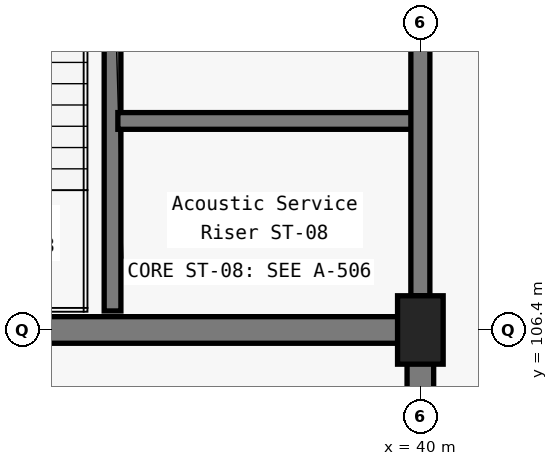
"""IFC4 building model, lengths in metres.
Left out: names, types, materials, properties, quantities, classifications, styles, units other than length and angle.
Written with IfcOpenShell. Run it as: python <this file> out.ifc"""

import sys

from ifc_helpers import new_model, si_unit, direction, frame, frame_2d, origin, origin_2d, place, context, subcontext, project, spatial, rectangle, extrude, element, save


model = new_model("IFC4")
c1 = context("Model", 3, precision=1e-05, world=origin(), true_north=direction((0.0, 1.0)))
c2 = subcontext(c1, "Body", "Model", "MODEL_VIEW")
j1 = project(units=[si_unit("LENGTHUNIT", "METRE"), si_unit("PLANEANGLEUNIT", "RADIAN")], contexts=[c1])
p1 = place(None, origin())
s1 = spatial("IfcSite", under=j1, at=p1, CompositionType="ELEMENT")
p2 = place(p1, origin())
s2 = spatial("IfcBuilding", under=s1, at=p2, CompositionType="ELEMENT")
p3 = place(p2, frame((0.0, 0.0, -5.4)))
s3 = spatial("IfcBuildingStorey", under=s2, at=p3, CompositionType="ELEMENT", Elevation=-5.4)
p4 = place(p3, frame((40.0, 106.4, 0.0), z_axis=(0.0, 0.0, 1.0), x_axis=(1.0, 0.0, 0.0)))
e1 = element("IfcColumn", 1, at=p4, inside=s3, PredefinedType="COLUMN", context=c2, shape_type="SweptSolid", body=[
    extrude(rectangle(XDim=0.6, YDim=0.9, at=origin_2d()), origin(), (0.0, 0.0, 1.0), 5.4),
])
p5 = place(p3, frame((32.0, 106.4, 0.0), z_axis=(0.0, 0.0, 1.0), x_axis=(1.0, 0.0, 0.0)))
e2 = element("IfcWall", 2, at=p5, inside=s3, PredefinedType="SHEAR", context=c2, shape_type="SweptSolid", body=[
    extrude(rectangle(XDim=8.0, YDim=0.35, at=frame_2d((4.0, 0.0))), origin(), (0.0, 0.0, 1.0), 5.08),
])
p6 = place(p3, frame((40.0, 98.8, 0.0), z_axis=(0.0, 0.0, 1.0), x_axis=(0.0, 1.0, 0.0)))
e3 = element("IfcWall", 3, at=p6, inside=s3, PredefinedType="SHEAR", context=c2, shape_type="SweptSolid", body=[
    extrude(rectangle(XDim=7.6, YDim=0.35, at=frame_2d((3.8, 0.0))), origin(), (0.0, 0.0, 1.0), 5.08),
])
p7 = place(p3, frame((35.95, 106.65, 0.0), z_axis=(0.0, 0.0, 1.0), x_axis=(0.0, 1.0, 0.0)))
e4 = element("IfcWall", 4, at=p7, inside=s3, PredefinedType="SOLIDWALL", context=c2, shape_type="SweptSolid", body=[
    extrude(rectangle(XDim=7.1, YDim=0.22, at=frame_2d((3.55, 0.0))), origin(), (0.0, 0.0, 1.0), 5.08),
])
p8 = place(p7, frame((5.55, 0.0, 0.0)))
e5 = element("IfcOpeningElement", 5, at=p8, cuts=e4, PredefinedType="OPENING", context=c2, shape_type="SweptSolid", body=[
    extrude(rectangle(XDim=1.2, YDim=2.15, at=frame_2d((0.6, 1.075))), frame((0.0, 0.12, 0.0), z_axis=(0.0, -1.0, 0.0), x_axis=(1.0, 0.0, 0.0)), (0.0, 0.0, 1.0), 0.24),
])
p9 = place(p3, frame((36.02, 109.15, 0.0), z_axis=(0.0, 0.0, 1.0), x_axis=(1.0, 0.0, 0.0)))
e6 = element("IfcWall", 6, at=p9, inside=s3, PredefinedType="SOLIDWALL", context=c2, shape_type="SweptSolid", body=[
    extrude(rectangle(XDim=3.93, YDim=0.22, at=frame_2d((1.965, 0.0))), origin(), (0.0, 0.0, 1.0), 4.435),
])
p10 = place(p3, frame((40.0, 106.85, 0.0), z_axis=(0.0, 0.0, 1.0), x_axis=(0.0, 1.0, 0.0)))
e7 = element("IfcWall", 7, at=p10, inside=s3, PredefinedType="SOLIDWALL", context=c2, shape_type="SweptSolid", body=[
    extrude(rectangle(XDim=6.775, YDim=0.25, at=frame_2d((3.387, 0.0))), origin(), (0.0, 0.0, 1.0), 4.305),
])
p11 = place(p10, frame((3.4, 0.0, 0.0)))
e8 = element("IfcOpeningElement", 8, at=p11, cuts=e7, PredefinedType="OPENING", context=c2, shape_type="SweptSolid", body=[
    extrude(rectangle(XDim=1.35, YDim=2.2, at=frame_2d((0.675, 1.1))), frame((0.0, 0.135, 0.0), z_axis=(0.0, -1.0, 0.0), x_axis=(1.0, 0.0, 0.0)), (0.0, 0.0, 1.0), 0.27),
])
save(model, sys.argv[1])
